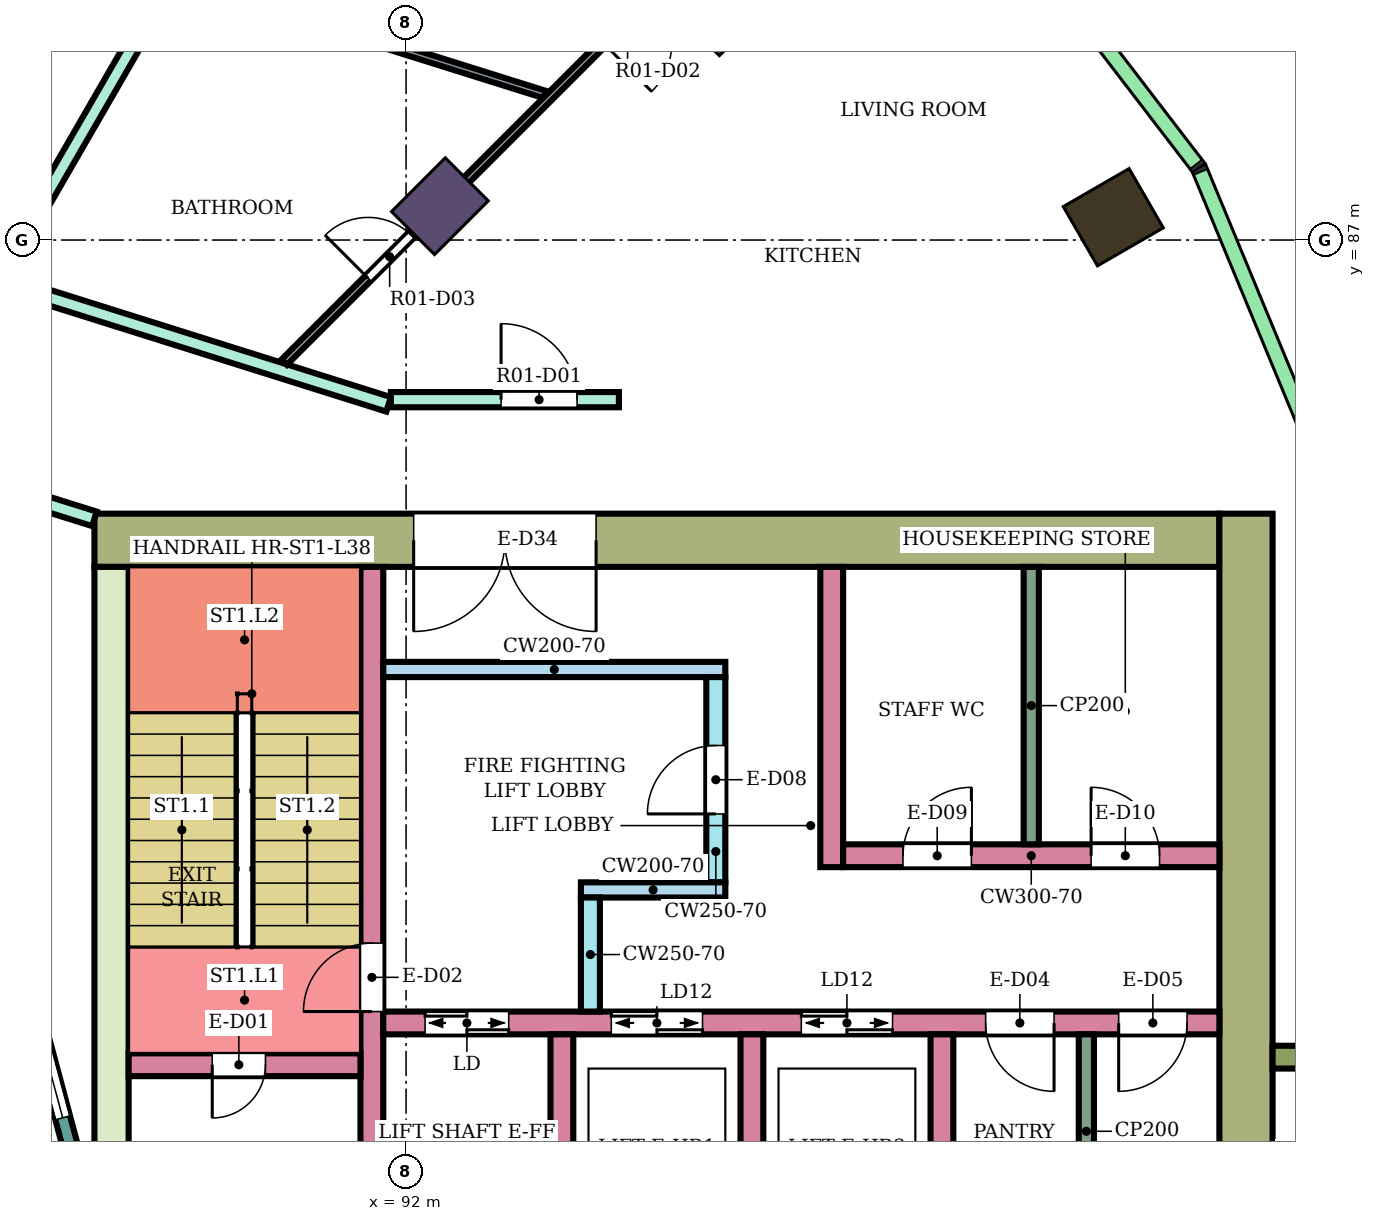
"""IFC4 building model, lengths in metres.
Left out: names, types, materials, properties, quantities, classifications, styles, units other than length and angle.
Written with IfcOpenShell. Run it as: python <this file> out.ifc"""

import sys

from ifc_helpers import new_model, si_unit, direction, frame, frame_2d, origin, origin_2d, place, context, subcontext, project, spatial, rectangle, extrude, element, fill, save


model = new_model("IFC4")
c1 = context("Model", 3, precision=1e-05, world=origin(), true_north=direction((0.0, 1.0)))
c2 = subcontext(c1, "Body", "Model", "MODEL_VIEW")
j1 = project(units=[si_unit("LENGTHUNIT", "METRE"), si_unit("PLANEANGLEUNIT", "RADIAN")], contexts=[c1])
p1 = place(None, origin())
s1 = spatial("IfcSite", under=j1, at=p1, CompositionType="ELEMENT")
p2 = place(p1, origin())
s2 = spatial("IfcBuilding", under=s1, at=p2, CompositionType="ELEMENT")
p3 = place(p2, frame((0.0, 0.0, 165.9)))
s3 = spatial("IfcBuildingStorey", under=s2, at=p3, CompositionType="ELEMENT", Elevation=165.9)
p4 = place(p3, frame((101.304, 87.3, 0.0), z_axis=(0.0, 0.0, 1.0), x_axis=(0.866025403784, 0.5, 0.0)))
e1 = element("IfcColumn", 1, at=p4, inside=s3, PredefinedType="COLUMN", context=c2, shape_type="SweptSolid", body=[
    extrude(rectangle(XDim=1.0, YDim=0.9, at=origin_2d()), origin(), (0.0, 0.0, 1.0), 4.1),
])
p5 = place(p3, frame((92.445, 87.445, 0.0), z_axis=(0.0, 0.0, 1.0), x_axis=(0.707106781187, 0.707106781187, 0.0)))
e2 = element("IfcColumn", 2, at=p5, inside=s3, PredefinedType="COLUMN", context=c2, shape_type="SweptSolid", body=[
    extrude(rectangle(XDim=1.0, YDim=0.8, at=origin_2d()), origin(), (0.0, 0.0, 1.0), 4.1),
])
p6 = place(p3, frame((95.91, 90.91, 0.0), z_axis=(0.0, 0.0, 1.0), x_axis=(0.707106781187, 0.707106781187, 0.0)))
e3 = element("IfcColumn", 3, at=p6, inside=s3, PredefinedType="COLUMN", context=c2, shape_type="SweptSolid", body=[
    extrude(rectangle(XDim=1.8, YDim=2.4, at=origin_2d()), origin(), (0.0, 0.0, 1.0), 4.1),
])
p7 = place(p3, frame((87.9, 83.05, 0.0), z_axis=(0.0, 0.0, 1.0), x_axis=(1.0, 0.0, 0.0)))
e4 = element("IfcWall", 4, at=p7, inside=s3, PredefinedType="SHEAR", context=c2, shape_type="SweptSolid", body=[
    extrude(rectangle(XDim=14.8, YDim=0.7, at=frame_2d((7.4, 0.0))), origin(), (0.0, 0.0, 1.0), 3.78),
])
p8 = place(p7, frame((4.2, 0.0, 0.0)))
e5 = element("IfcOpeningElement", 5, at=p8, cuts=e4, PredefinedType="OPENING", context=c2, shape_type="SweptSolid", body=[
    extrude(rectangle(XDim=2.4, YDim=2.4, at=frame_2d((1.2, 1.2))), frame((0.0, 0.36, 0.0), z_axis=(0.0, -1.0, 0.0), x_axis=(1.0, 0.0, 0.0)), (0.0, 0.0, 1.0), 0.72),
])
p9 = place(p3, frame((88.125, 75.0, 0.0), z_axis=(0.0, 0.0, 1.0), x_axis=(0.0, 1.0, 0.0)))
e6 = element("IfcWall", 6, at=p9, inside=s3, PredefinedType="SHEAR", context=c2, shape_type="SweptSolid", body=[
    extrude(rectangle(XDim=7.7, YDim=0.45, at=frame_2d((3.85, 0.0))), origin(), (0.0, 0.0, 1.0), 3.78),
])
p10 = place(p3, frame((103.05, 66.6, 0.0), z_axis=(0.0, 0.0, 1.0), x_axis=(0.0, 1.0, 0.0)))
e7 = element("IfcWall", 7, at=p10, inside=s3, PredefinedType="SHEAR", context=c2, shape_type="SweptSolid", body=[
    extrude(rectangle(XDim=16.8, YDim=0.7, at=frame_2d((8.4, 0.0))), origin(), (0.0, 0.0, 1.0), 3.78),
])
p11 = place(p3, frame((91.55, 75.0, 0.0), z_axis=(0.0, 0.0, 1.0), x_axis=(0.0, 1.0, 0.0)))
e8 = element("IfcWall", 8, at=p11, inside=s3, PredefinedType="SHEAR", context=c2, shape_type="SweptSolid", body=[
    extrude(rectangle(XDim=7.7, YDim=0.3, at=frame_2d((3.85, 0.0))), origin(), (0.0, 0.0, 1.0), 3.78),
])
p12 = place(p11, frame((1.85, 0.0, 0.0)))
e9 = element("IfcOpeningElement", 9, at=p12, cuts=e8, PredefinedType="OPENING", context=c2, shape_type="SweptSolid", body=[
    extrude(rectangle(XDim=0.9, YDim=2.1, at=frame_2d((0.45, 1.05))), frame((0.0, 0.16, 0.0), z_axis=(0.0, -1.0, 0.0), x_axis=(1.0, 0.0, 0.0)), (0.0, 0.0, 1.0), 0.32),
])
p13 = place(p3, frame((88.35, 76.15, 0.0), z_axis=(0.0, 0.0, 1.0), x_axis=(1.0, 0.0, 0.0)))
e10 = element("IfcWall", 10, at=p13, inside=s3, PredefinedType="SHEAR", context=c2, shape_type="SweptSolid", body=[
    extrude(rectangle(XDim=3.05, YDim=0.3, at=frame_2d((1.525, 0.0))), origin(), (0.0, 0.0, 1.0), 3.78),
])
p14 = place(p13, frame((1.1, 0.0, 0.0)))
e11 = element("IfcOpeningElement", 11, at=p14, cuts=e10, PredefinedType="OPENING", context=c2, shape_type="SweptSolid", body=[
    extrude(rectangle(XDim=0.7, YDim=2.0, at=frame_2d((0.35, 1.0))), frame((0.0, 0.16, 0.0), z_axis=(0.0, -1.0, 0.0), x_axis=(1.0, 0.0, 0.0)), (0.0, 0.0, 1.0), 0.32),
])
p15 = place(p3, frame((91.7, 76.7, 0.0), z_axis=(0.0, 0.0, 1.0), x_axis=(1.0, 0.0, 0.0)))
e12 = element("IfcWall", 12, at=p15, inside=s3, PredefinedType="SHEAR", context=c2, shape_type="SweptSolid", body=[
    extrude(rectangle(XDim=11.0, YDim=0.3, at=frame_2d((5.5, 0.0))), origin(), (0.0, 0.0, 1.0), 3.78),
])
p16 = place(p15, frame((0.55, 0.0, 0.0)))
e13 = element("IfcOpeningElement", 13, at=p16, cuts=e12, PredefinedType="OPENING", context=c2, shape_type="SweptSolid", body=[
    extrude(rectangle(XDim=1.1, YDim=2.1, at=frame_2d((0.55, 1.05))), frame((0.0, 0.16, 0.0), z_axis=(0.0, -1.0, 0.0), x_axis=(1.0, 0.0, 0.0)), (0.0, 0.0, 1.0), 0.32),
])
p17 = place(p15, frame((3.0, 0.0, 0.0)))
e14 = element("IfcOpeningElement", 14, at=p17, cuts=e12, PredefinedType="OPENING", context=c2, shape_type="SweptSolid", body=[
    extrude(rectangle(XDim=1.2, YDim=2.1, at=frame_2d((0.6, 1.05))), frame((0.0, 0.16, 0.0), z_axis=(0.0, -1.0, 0.0), x_axis=(1.0, 0.0, 0.0)), (0.0, 0.0, 1.0), 0.32),
])
p18 = place(p15, frame((5.5, 0.0, 0.0)))
e15 = element("IfcOpeningElement", 15, at=p18, cuts=e12, PredefinedType="OPENING", context=c2, shape_type="SweptSolid", body=[
    extrude(rectangle(XDim=1.2, YDim=2.1, at=frame_2d((0.6, 1.05))), frame((0.0, 0.16, 0.0), z_axis=(0.0, -1.0, 0.0), x_axis=(1.0, 0.0, 0.0)), (0.0, 0.0, 1.0), 0.32),
])
p19 = place(p15, frame((7.925, 0.0, 0.0)))
e16 = element("IfcOpeningElement", 16, at=p19, cuts=e12, PredefinedType="OPENING", context=c2, shape_type="SweptSolid", body=[
    extrude(rectangle(XDim=0.9, YDim=2.1, at=frame_2d((0.45, 1.05))), frame((0.0, 0.16, 0.0), z_axis=(0.0, -1.0, 0.0), x_axis=(1.0, 0.0, 0.0)), (0.0, 0.0, 1.0), 0.32),
])
p20 = place(p15, frame((9.675, 0.0, 0.0)))
e17 = element("IfcOpeningElement", 17, at=p20, cuts=e12, PredefinedType="OPENING", context=c2, shape_type="SweptSolid", body=[
    extrude(rectangle(XDim=0.9, YDim=2.1, at=frame_2d((0.45, 1.05))), frame((0.0, 0.16, 0.0), z_axis=(0.0, -1.0, 0.0), x_axis=(1.0, 0.0, 0.0)), (0.0, 0.0, 1.0), 0.32),
])
for number, where, z_axis, x_axis in (
    (18, (94.05, 74.0, 0.0), (0.0, 0.0, 1.0), (0.0, 1.0, 0.0)),
    (19, (96.55, 74.0, 0.0), (0.0, 0.0, 1.0), (0.0, 1.0, 0.0)),
    (20, (99.05, 74.0, 0.0), (0.0, 0.0, 1.0), (0.0, 1.0, 0.0)),
):
    element("IfcWall", number, at=place(p3, frame(where, z_axis=z_axis, x_axis=x_axis)), inside=s3, PredefinedType="SHEAR", context=c2, shape_type="SweptSolid", body=[
        extrude(rectangle(XDim=2.55, YDim=0.3, at=frame_2d((1.275, 0.0))), origin(), (0.0, 0.0, 1.0), 3.78),
    ])
p21 = place(p3, frame((91.7, 81.35, 0.0), z_axis=(0.0, 0.0, 1.0), x_axis=(1.0, 0.0, 0.0)))
e21 = element("IfcWall", 21, at=p21, inside=s3, PredefinedType="SHEAR", context=c2, shape_type="SweptSolid", body=[
    extrude(rectangle(XDim=4.5, YDim=0.2, at=frame_2d((2.25, 0.0))), origin(), (0.0, 0.0, 1.0), 3.78),
])
p22 = place(p3, frame((96.075, 78.55, 0.0), z_axis=(0.0, 0.0, 1.0), x_axis=(0.0, 1.0, 0.0)))
e22 = element("IfcWall", 22, at=p22, inside=s3, PredefinedType="SHEAR", context=c2, shape_type="SweptSolid", body=[
    extrude(rectangle(XDim=2.7, YDim=0.25, at=frame_2d((1.35, 0.0))), origin(), (0.0, 0.0, 1.0), 3.78),
])
p23 = place(p22, frame((0.9, 0.0, 0.0)))
e23 = element("IfcOpeningElement", 23, at=p23, cuts=e22, PredefinedType="OPENING", context=c2, shape_type="SweptSolid", body=[
    extrude(rectangle(XDim=0.9, YDim=2.1, at=frame_2d((0.45, 1.05))), frame((0.0, 0.135, 0.0), z_axis=(0.0, -1.0, 0.0), x_axis=(1.0, 0.0, 0.0)), (0.0, 0.0, 1.0), 0.27),
])
p24 = place(p3, frame((94.3, 78.45, 0.0), z_axis=(0.0, 0.0, 1.0), x_axis=(1.0, 0.0, 0.0)))
e24 = element("IfcWall", 24, at=p24, inside=s3, PredefinedType="SHEAR", context=c2, shape_type="SweptSolid", body=[
    extrude(rectangle(XDim=1.9, YDim=0.2, at=frame_2d((0.95, 0.0))), origin(), (0.0, 0.0, 1.0), 3.78),
])
p25 = place(p3, frame((94.425, 76.85, 0.0), z_axis=(0.0, 0.0, 1.0), x_axis=(0.0, 1.0, 0.0)))
e25 = element("IfcWall", 25, at=p25, inside=s3, PredefinedType="SHEAR", context=c2, shape_type="SweptSolid", body=[
    extrude(rectangle(XDim=1.5, YDim=0.25, at=frame_2d((0.75, 0.0))), origin(), (0.0, 0.0, 1.0), 3.78),
])
p26 = place(p3, frame((97.6, 78.75, 0.0), z_axis=(0.0, 0.0, 1.0), x_axis=(0.0, 1.0, 0.0)))
e26 = element("IfcWall", 26, at=p26, inside=s3, PredefinedType="SHEAR", context=c2, shape_type="SweptSolid", body=[
    extrude(rectangle(XDim=3.95, YDim=0.3, at=frame_2d((1.975, 0.0))), origin(), (0.0, 0.0, 1.0), 3.78),
])
p27 = place(p3, frame((97.75, 78.9, 0.0), z_axis=(0.0, 0.0, 1.0), x_axis=(1.0, 0.0, 0.0)))
e27 = element("IfcWall", 27, at=p27, inside=s3, PredefinedType="SHEAR", context=c2, shape_type="SweptSolid", body=[
    extrude(rectangle(XDim=4.95, YDim=0.3, at=frame_2d((2.475, 0.0))), origin(), (0.0, 0.0, 1.0), 3.78),
])
p28 = place(p27, frame((0.788, 0.0, 0.0)))
e28 = element("IfcOpeningElement", 28, at=p28, cuts=e27, PredefinedType="OPENING", context=c2, shape_type="SweptSolid", body=[
    extrude(rectangle(XDim=0.9, YDim=2.1, at=frame_2d((0.45, 1.05))), frame((0.0, 0.16, 0.0), z_axis=(0.0, -1.0, 0.0), x_axis=(1.0, 0.0, 0.0)), (0.0, 0.0, 1.0), 0.32),
])
p29 = place(p27, frame((3.262, 0.0, 0.0)))
e29 = element("IfcOpeningElement", 29, at=p29, cuts=e27, PredefinedType="OPENING", context=c2, shape_type="SweptSolid", body=[
    extrude(rectangle(XDim=0.9, YDim=2.1, at=frame_2d((0.45, 1.05))), frame((0.0, 0.16, 0.0), z_axis=(0.0, -1.0, 0.0), x_axis=(1.0, 0.0, 0.0)), (0.0, 0.0, 1.0), 0.32),
])
p30 = place(p3, frame((103.4, 76.25, 0.0), z_axis=(0.0, 0.0, 1.0), x_axis=(1.0, 0.0, 0.0)))
e30 = element("IfcWall", 30, at=p30, inside=s3, PredefinedType="NOTDEFINED", context=c2, shape_type="SweptSolid", body=[
    extrude(rectangle(XDim=2.416, YDim=0.3, at=frame_2d((1.208, 0.0))), origin(), (0.0, 0.0, 1.0), 4.1),
])
p31 = place(p3, frame((87.604, 75.0, 0.0), z_axis=(0.0, 0.0, 1.0), x_axis=(-0.258789828301, 0.965933654434, 0.0)))
e31 = element("IfcWall", 31, at=p31, inside=s3, PredefinedType="NOTDEFINED", context=c2, shape_type="SweptSolid", body=[
    extrude(rectangle(XDim=3.936, YDim=0.2, at=frame_2d((1.968, 0.0))), origin(), (0.0, 0.0, 1.0), 4.1),
])
p32 = place(p31, frame((0.468, 0.0, 0.9)))
e32 = element("IfcOpeningElement", 32, at=p32, cuts=e31, PredefinedType="OPENING", context=c2, shape_type="SweptSolid", body=[
    extrude(rectangle(XDim=3.0, YDim=2.3, at=frame_2d((1.5, 1.15))), frame((0.0, 0.11, 0.0), z_axis=(0.0, -1.0, 0.0), x_axis=(1.0, 0.0, 0.0)), (0.0, 0.0, 1.0), 0.22),
])
p33 = place(p3, frame((85.587, 84.057, 0.0), z_axis=(0.0, 0.0, 1.0), x_axis=(0.954239513179, -0.299043393987, 0.0)))
e33 = element("IfcWall", 33, at=p33, inside=s3, PredefinedType="PARTITIONING", context=c2, shape_type="SweptSolid", body=[
    extrude(rectangle(XDim=2.424, YDim=0.2, at=frame_2d((1.212, 0.0))), origin(), (0.0, 0.0, 1.0), 3.65),
])
p34 = place(p33, frame((0.762, 0.0, 0.0)))
e34 = element("IfcOpeningElement", 34, at=p34, cuts=e33, PredefinedType="OPENING", context=c2, shape_type="SweptSolid", body=[
    extrude(rectangle(XDim=0.9, YDim=2.1, at=frame_2d((0.45, 1.05))), frame((0.0, 0.11, 0.0), z_axis=(0.0, -1.0, 0.0), x_axis=(1.0, 0.0, 0.0)), (0.0, 0.0, 1.0), 0.22),
])
p35 = place(p3, frame((86.313, 86.555, 0.0), z_axis=(0.0, 0.0, 1.0), x_axis=(0.953919398959, -0.300062960544, 0.0)))
e35 = element("IfcWall", 35, at=p35, inside=s3, PredefinedType="PARTITIONING", context=c2, shape_type="SweptSolid", body=[
    extrude(rectangle(XDim=5.721, YDim=0.2, at=frame_2d((2.86, 0.0))), origin(), (0.0, 0.0, 1.0), 3.65),
])
p36 = place(p3, frame((86.677, 86.564, 0.0), z_axis=(0.0, 0.0, 1.0), x_axis=(0.500120377296, 0.865955892764, 0.0)))
e36 = element("IfcWall", 36, at=p36, inside=s3, PredefinedType="PARTITIONING", context=c2, shape_type="SweptSolid", body=[
    extrude(rectangle(XDim=12.445, YDim=0.2, at=frame_2d((6.222, 0.0))), origin(), (0.0, 0.0, 1.0), 3.65),
])
p37 = place(p3, frame((91.8, 84.9, 0.0), z_axis=(0.0, 0.0, 1.0), x_axis=(1.0, 0.0, 0.0)))
e37 = element("IfcWall", 37, at=p37, inside=s3, PredefinedType="PARTITIONING", context=c2, shape_type="SweptSolid", body=[
    extrude(rectangle(XDim=3.0, YDim=0.2, at=frame_2d((1.5, 0.0))), origin(), (0.0, 0.0, 1.0), 3.65),
])
p38 = place(p37, frame((1.45, 0.0, 0.0)))
e38 = element("IfcOpeningElement", 38, at=p38, cuts=e37, PredefinedType="OPENING", context=c2, shape_type="SweptSolid", body=[
    extrude(rectangle(XDim=1.0, YDim=2.1, at=frame_2d((0.5, 1.05))), frame((0.0, 0.11, 0.0), z_axis=(0.0, -1.0, 0.0), x_axis=(1.0, 0.0, 0.0)), (0.0, 0.0, 1.0), 0.22),
])
p39 = place(p3, frame((89.026, 90.419, 0.0), z_axis=(0.0, 0.0, 1.0), x_axis=(0.954207609901, -0.299145177475, 0.0)))
e39 = element("IfcWall", 39, at=p39, inside=s3, PredefinedType="PARTITIONING", context=c2, shape_type="SweptSolid", body=[
    extrude(rectangle(XDim=5.031, YDim=0.1, at=frame_2d((2.516, 0.0))), origin(), (0.0, 0.0, 1.0), 3.65),
])
p40 = place(p3, frame((90.396, 85.393, 0.0), z_axis=(0.0, 0.0, 1.0), x_axis=(0.707236031471, 0.706977507273, 0.0)))
e40 = element("IfcWall", 40, at=p40, inside=s3, PredefinedType="PARTITIONING", context=c2, shape_type="SweptSolid", body=[
    extrude(rectangle(XDim=8.499, YDim=0.1, at=frame_2d((4.25, 0.0))), origin(), (0.0, 0.0, 1.0), 3.65),
])
p41 = place(p40, frame((5.937, 0.0, 0.0)))
e41 = element("IfcOpeningElement", 41, at=p41, cuts=e40, PredefinedType="OPENING", context=c2, shape_type="SweptSolid", body=[
    extrude(rectangle(XDim=0.9, YDim=2.1, at=frame_2d((0.45, 1.05))), frame((0.0, 0.06, 0.0), z_axis=(0.0, -1.0, 0.0), x_axis=(1.0, 0.0, 0.0)), (0.0, 0.0, 1.0), 0.12),
])
p42 = place(p40, frame((1.562, 0.0, 0.0)))
e42 = element("IfcOpeningElement", 42, at=p42, cuts=e40, PredefinedType="OPENING", context=c2, shape_type="SweptSolid", body=[
    extrude(rectangle(XDim=0.8, YDim=2.1, at=frame_2d((0.4, 1.05))), frame((0.0, 0.06, 0.0), z_axis=(0.0, -1.0, 0.0), x_axis=(1.0, 0.0, 0.0)), (0.0, 0.0, 1.0), 0.12),
])
p43 = place(p3, frame((100.95, 74.0, 0.0), z_axis=(0.0, 0.0, 1.0), x_axis=(0.0, 1.0, 0.0)))
e43 = element("IfcWall", 43, at=p43, inside=s3, PredefinedType="PARTITIONING", context=c2, shape_type="SweptSolid", body=[
    extrude(rectangle(XDim=2.55, YDim=0.2, at=frame_2d((1.275, 0.0))), origin(), (0.0, 0.0, 1.0), 3.78),
])
p44 = place(p3, frame((100.225, 79.05, 0.0), z_axis=(0.0, 0.0, 1.0), x_axis=(0.0, 1.0, 0.0)))
e44 = element("IfcWall", 44, at=p44, inside=s3, PredefinedType="PARTITIONING", context=c2, shape_type="SweptSolid", body=[
    extrude(rectangle(XDim=3.65, YDim=0.2, at=frame_2d((1.825, 0.0))), origin(), (0.0, 0.0, 1.0), 3.78),
])
p45 = place(p32, origin())
e45 = element("IfcWindow", 45, at=p45, inside=s3, PartitioningType="SINGLE_PANEL", PredefinedType="WINDOW", context=c2, shape_type="SweptSolid", body=[
    extrude(rectangle(XDim=3.0, YDim=2.3, at=frame_2d((1.5, 1.15))), frame((0.0, 0.03, 0.0), z_axis=(0.0, -1.0, 0.0), x_axis=(1.0, 0.0, 0.0)), (0.0, 0.0, 1.0), 0.06),
])
fill(e32, e45)
p46 = place(p38, origin())
e46 = element("IfcDoor", 46, at=p46, inside=s3, OperationType="SINGLE_SWING_LEFT", PredefinedType="DOOR", context=c2, shape_type="SweptSolid", body=[
    extrude(rectangle(XDim=1.0, YDim=2.1, at=frame_2d((0.5, 1.05))), frame((0.0, 0.025, 0.0), z_axis=(0.0, -1.0, 0.0), x_axis=(1.0, 0.0, 0.0)), (0.0, 0.0, 1.0), 0.05),
])
fill(e38, e46)
p47 = place(p42, origin())
e47 = element("IfcDoor", 47, at=p47, inside=s3, OperationType="SINGLE_SWING_LEFT", PredefinedType="DOOR", context=c2, shape_type="SweptSolid", body=[
    extrude(rectangle(XDim=0.8, YDim=2.1, at=frame_2d((0.4, 1.05))), frame((0.0, 0.025, 0.0), z_axis=(0.0, -1.0, 0.0), x_axis=(1.0, 0.0, 0.0)), (0.0, 0.0, 1.0), 0.05),
])
fill(e42, e47)
p48 = place(p14, frame((0.7, 0.0, 0.0), z_axis=(0.0, 0.0, 1.0), x_axis=(-1.0, 0.0, 0.0)))
e48 = element("IfcDoor", 48, at=p48, inside=s3, OperationType="SINGLE_SWING_RIGHT", PredefinedType="DOOR", context=c2, shape_type="SweptSolid", body=[
    extrude(rectangle(XDim=0.7, YDim=2.0, at=frame_2d((0.35, 1.0))), frame((0.0, 0.025, 0.0), z_axis=(0.0, -1.0, 0.0), x_axis=(1.0, 0.0, 0.0)), (0.0, 0.0, 1.0), 0.05),
])
fill(e11, e48)
p49 = place(p12, origin())
e49 = element("IfcDoor", 49, at=p49, inside=s3, OperationType="SINGLE_SWING_LEFT", PredefinedType="DOOR", context=c2, shape_type="SweptSolid", body=[
    extrude(rectangle(XDim=0.9, YDim=2.1, at=frame_2d((0.45, 1.05))), frame((0.0, 0.025, 0.0), z_axis=(0.0, -1.0, 0.0), x_axis=(1.0, 0.0, 0.0)), (0.0, 0.0, 1.0), 0.05),
])
fill(e9, e49)
p50 = place(p16, origin())
e50 = element("IfcDoor", 50, at=p50, inside=s3, OperationType="DOUBLE_DOOR_SLIDING", PredefinedType="DOOR", context=c2, shape_type="SweptSolid", body=[
    extrude(rectangle(XDim=1.1, YDim=2.1, at=frame_2d((0.55, 1.05))), frame((0.0, 0.025, 0.0), z_axis=(0.0, -1.0, 0.0), x_axis=(1.0, 0.0, 0.0)), (0.0, 0.0, 1.0), 0.05),
])
fill(e13, e50)
p51 = place(p17, origin())
e51 = element("IfcDoor", 51, at=p51, inside=s3, OperationType="DOUBLE_DOOR_SLIDING", PredefinedType="DOOR", context=c2, shape_type="SweptSolid", body=[
    extrude(rectangle(XDim=1.2, YDim=2.1, at=frame_2d((0.6, 1.05))), frame((0.0, 0.025, 0.0), z_axis=(0.0, -1.0, 0.0), x_axis=(1.0, 0.0, 0.0)), (0.0, 0.0, 1.0), 0.05),
])
fill(e14, e51)
p52 = place(p18, origin())
e52 = element("IfcDoor", 52, at=p52, inside=s3, OperationType="DOUBLE_DOOR_SLIDING", PredefinedType="DOOR", context=c2, shape_type="SweptSolid", body=[
    extrude(rectangle(XDim=1.2, YDim=2.1, at=frame_2d((0.6, 1.05))), frame((0.0, 0.025, 0.0), z_axis=(0.0, -1.0, 0.0), x_axis=(1.0, 0.0, 0.0)), (0.0, 0.0, 1.0), 0.05),
])
fill(e15, e52)
p53 = place(p19, frame((0.9, 0.0, 0.0), z_axis=(0.0, 0.0, 1.0), x_axis=(-1.0, 0.0, 0.0)))
e53 = element("IfcDoor", 53, at=p53, inside=s3, OperationType="SINGLE_SWING_LEFT", PredefinedType="DOOR", context=c2, shape_type="SweptSolid", body=[
    extrude(rectangle(XDim=0.9, YDim=2.1, at=frame_2d((0.45, 1.05))), frame((0.0, 0.025, 0.0), z_axis=(0.0, -1.0, 0.0), x_axis=(1.0, 0.0, 0.0)), (0.0, 0.0, 1.0), 0.05),
])
fill(e16, e53)
p54 = place(p20, frame((0.9, 0.0, 0.0), z_axis=(0.0, 0.0, 1.0), x_axis=(-1.0, 0.0, 0.0)))
e54 = element("IfcDoor", 54, at=p54, inside=s3, OperationType="SINGLE_SWING_RIGHT", PredefinedType="DOOR", context=c2, shape_type="SweptSolid", body=[
    extrude(rectangle(XDim=0.9, YDim=2.1, at=frame_2d((0.45, 1.05))), frame((0.0, 0.025, 0.0), z_axis=(0.0, -1.0, 0.0), x_axis=(1.0, 0.0, 0.0)), (0.0, 0.0, 1.0), 0.05),
])
fill(e17, e54)
p55 = place(p23, origin())
e55 = element("IfcDoor", 55, at=p55, inside=s3, OperationType="SINGLE_SWING_LEFT", PredefinedType="DOOR", context=c2, shape_type="SweptSolid", body=[
    extrude(rectangle(XDim=0.9, YDim=2.1, at=frame_2d((0.45, 1.05))), frame((0.0, 0.025, 0.0), z_axis=(0.0, -1.0, 0.0), x_axis=(1.0, 0.0, 0.0)), (0.0, 0.0, 1.0), 0.05),
])
fill(e23, e55)
p56 = place(p28, origin())
e56 = element("IfcDoor", 56, at=p56, inside=s3, OperationType="SINGLE_SWING_RIGHT", PredefinedType="DOOR", context=c2, shape_type="SweptSolid", body=[
    extrude(rectangle(XDim=0.9, YDim=2.1, at=frame_2d((0.45, 1.05))), frame((0.0, 0.025, 0.0), z_axis=(0.0, -1.0, 0.0), x_axis=(1.0, 0.0, 0.0)), (0.0, 0.0, 1.0), 0.05),
])
fill(e28, e56)
p57 = place(p29, origin())
e57 = element("IfcDoor", 57, at=p57, inside=s3, OperationType="SINGLE_SWING_LEFT", PredefinedType="DOOR", context=c2, shape_type="SweptSolid", body=[
    extrude(rectangle(XDim=0.9, YDim=2.1, at=frame_2d((0.45, 1.05))), frame((0.0, 0.025, 0.0), z_axis=(0.0, -1.0, 0.0), x_axis=(1.0, 0.0, 0.0)), (0.0, 0.0, 1.0), 0.05),
])
fill(e29, e57)
p58 = place(p8, frame((2.4, 0.0, 0.0), z_axis=(0.0, 0.0, 1.0), x_axis=(-1.0, 0.0, 0.0)))
e58 = element("IfcDoor", 58, at=p58, inside=s3, OperationType="DOUBLE_DOOR_SINGLE_SWING", PredefinedType="DOOR", context=c2, shape_type="SweptSolid", body=[
    extrude(rectangle(XDim=2.4, YDim=2.4, at=frame_2d((1.2, 1.2))), frame((0.0, 0.025, 0.0), z_axis=(0.0, -1.0, 0.0), x_axis=(1.0, 0.0, 0.0)), (0.0, 0.0, 1.0), 0.05),
])
fill(e5, e58)
save(model, sys.argv[1])
